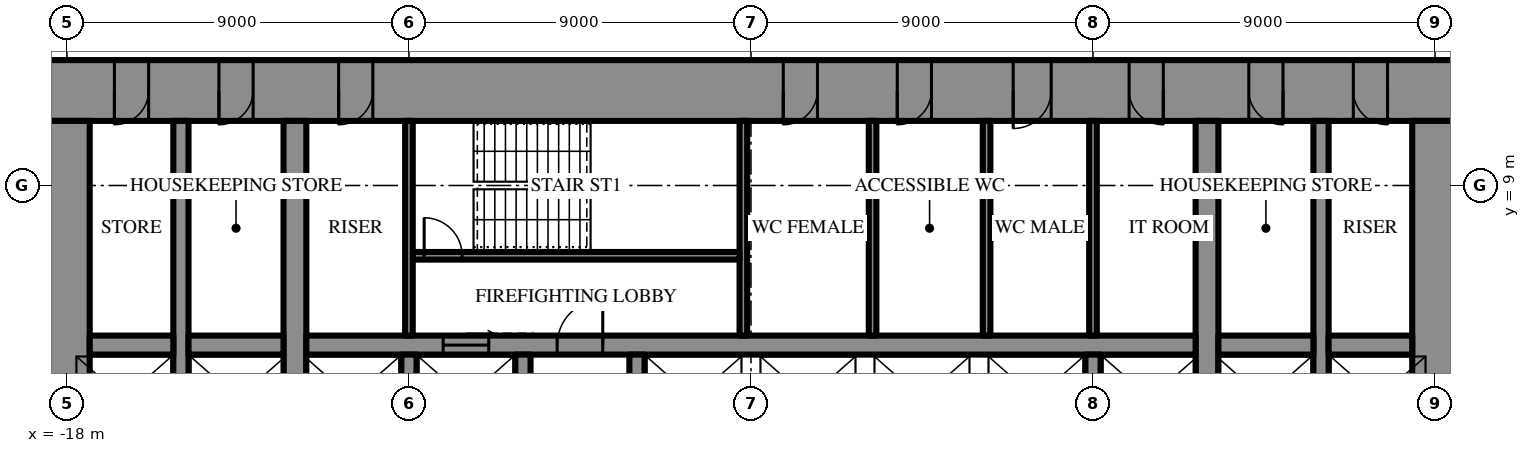
"""IFC4 building model, lengths in metres.
Left out: names, types, materials, properties, quantities, classifications, styles, units other than length and angle.
Written with IfcOpenShell. Run it as: python <this file> out.ifc"""

import sys

from ifc_helpers import new_model, si_unit, direction, frame, frame_2d, origin, place, context, subcontext, project, spatial, rectangle, extrude, element, fill, save


model = new_model("IFC4")
c1 = context("Model", 3, precision=1e-05, world=origin(), true_north=direction((0.0, 1.0)))
c2 = subcontext(c1, "Body", "Model", "MODEL_VIEW")
j1 = project(units=[si_unit("LENGTHUNIT", "METRE"), si_unit("PLANEANGLEUNIT", "RADIAN")], contexts=[c1])
p1 = place(None, origin())
s1 = spatial("IfcSite", under=j1, at=p1, CompositionType="ELEMENT")
p2 = place(p1, origin())
s2 = spatial("IfcBuilding", under=s1, at=p2, CompositionType="ELEMENT")
p3 = place(p2, frame((0.0, 0.0, 57.1)))
s3 = spatial("IfcBuildingStorey", under=s2, at=p3, CompositionType="ELEMENT", Elevation=57.1)
p4 = place(p3, frame((-18.6, 11.5, 0.0), z_axis=(0.0, 0.0, 1.0), x_axis=(1.0, 0.0, 0.0)))
e1 = element("IfcWall", 1, at=p4, inside=s3, PredefinedType="SHEAR", context=c2, shape_type="SweptSolid", body=[
    extrude(rectangle(XDim=37.2, YDim=1.6, at=frame_2d((18.6, 0.0))), origin(), (0.0, 0.0, 1.0), 4.2),
])
p5 = place(p4, frame((19.45, 0.0, 0.0)))
e2 = element("IfcOpeningElement", 2, at=p5, cuts=e1, PredefinedType="OPENING", context=c2, shape_type="SweptSolid", body=[
    extrude(rectangle(XDim=0.9, YDim=2.2, at=frame_2d((0.45, 1.1))), frame((0.0, 0.81, 0.0), z_axis=(0.0, -1.0, 0.0), x_axis=(1.0, 0.0, 0.0)), (0.0, 0.0, 1.0), 1.62),
])
p6 = place(p4, frame((22.45, 0.0, 0.0)))
e3 = element("IfcOpeningElement", 3, at=p6, cuts=e1, PredefinedType="OPENING", context=c2, shape_type="SweptSolid", body=[
    extrude(rectangle(XDim=0.9, YDim=2.2, at=frame_2d((0.45, 1.1))), frame((0.0, 0.81, 0.0), z_axis=(0.0, -1.0, 0.0), x_axis=(1.0, 0.0, 0.0)), (0.0, 0.0, 1.0), 1.62),
])
p7 = place(p4, frame((25.5, 0.0, 0.0)))
e4 = element("IfcOpeningElement", 4, at=p7, cuts=e1, PredefinedType="OPENING", context=c2, shape_type="SweptSolid", body=[
    extrude(rectangle(XDim=1.0, YDim=2.2, at=frame_2d((0.5, 1.1))), frame((0.0, 0.81, 0.0), z_axis=(0.0, -1.0, 0.0), x_axis=(1.0, 0.0, 0.0)), (0.0, 0.0, 1.0), 1.62),
])
p8 = place(p4, frame((1.85, 0.0, 0.0)))
e5 = element("IfcOpeningElement", 5, at=p8, cuts=e1, PredefinedType="OPENING", context=c2, shape_type="SweptSolid", body=[
    extrude(rectangle(XDim=0.9, YDim=2.2, at=frame_2d((0.45, 1.1))), frame((0.0, 0.81, 0.0), z_axis=(0.0, -1.0, 0.0), x_axis=(1.0, 0.0, 0.0)), (0.0, 0.0, 1.0), 1.62),
])
p9 = place(p4, frame((4.6, 0.0, 0.0)))
e6 = element("IfcOpeningElement", 6, at=p9, cuts=e1, PredefinedType="OPENING", context=c2, shape_type="SweptSolid", body=[
    extrude(rectangle(XDim=0.9, YDim=2.2, at=frame_2d((0.45, 1.1))), frame((0.0, 0.81, 0.0), z_axis=(0.0, -1.0, 0.0), x_axis=(1.0, 0.0, 0.0)), (0.0, 0.0, 1.0), 1.62),
])
p10 = place(p4, frame((7.75, 0.0, 0.0)))
e7 = element("IfcOpeningElement", 7, at=p10, cuts=e1, PredefinedType="OPENING", context=c2, shape_type="SweptSolid", body=[
    extrude(rectangle(XDim=0.9, YDim=2.2, at=frame_2d((0.45, 1.1))), frame((0.0, 0.81, 0.0), z_axis=(0.0, -1.0, 0.0), x_axis=(1.0, 0.0, 0.0)), (0.0, 0.0, 1.0), 1.62),
])
p11 = place(p4, frame((28.55, 0.0, 0.0)))
e8 = element("IfcOpeningElement", 8, at=p11, cuts=e1, PredefinedType="OPENING", context=c2, shape_type="SweptSolid", body=[
    extrude(rectangle(XDim=0.9, YDim=2.2, at=frame_2d((0.45, 1.1))), frame((0.0, 0.81, 0.0), z_axis=(0.0, -1.0, 0.0), x_axis=(1.0, 0.0, 0.0)), (0.0, 0.0, 1.0), 1.62),
])
p12 = place(p4, frame((31.7, 0.0, 0.0)))
e9 = element("IfcOpeningElement", 9, at=p12, cuts=e1, PredefinedType="OPENING", context=c2, shape_type="SweptSolid", body=[
    extrude(rectangle(XDim=0.9, YDim=2.2, at=frame_2d((0.45, 1.1))), frame((0.0, 0.81, 0.0), z_axis=(0.0, -1.0, 0.0), x_axis=(1.0, 0.0, 0.0)), (0.0, 0.0, 1.0), 1.62),
])
p13 = place(p4, frame((34.45, 0.0, 0.0)))
e10 = element("IfcOpeningElement", 10, at=p13, cuts=e1, PredefinedType="OPENING", context=c2, shape_type="SweptSolid", body=[
    extrude(rectangle(XDim=0.9, YDim=2.2, at=frame_2d((0.45, 1.1))), frame((0.0, 0.81, 0.0), z_axis=(0.0, -1.0, 0.0), x_axis=(1.0, 0.0, 0.0)), (0.0, 0.0, 1.0), 1.62),
])
p14 = place(p3, frame((18.0, -10.7, 0.0), z_axis=(0.0, 0.0, 1.0), x_axis=(0.0, 1.0, 0.0)))
e11 = element("IfcWall", 11, at=p14, inside=s3, PredefinedType="SHEAR", context=c2, shape_type="SweptSolid", body=[
    extrude(rectangle(XDim=21.4, YDim=1.2, at=frame_2d((10.7, 0.0))), origin(), (0.0, 0.0, 1.0), 4.2),
])
p15 = place(p14, frame((9.8, 0.0, 0.0)))
e12 = element("IfcOpeningElement", 12, at=p15, cuts=e11, PredefinedType="OPENING", context=c2, shape_type="SweptSolid", body=[
    extrude(rectangle(XDim=1.8, YDim=2.4, at=frame_2d((0.9, 1.2))), frame((0.0, 0.61, 0.0), z_axis=(0.0, -1.0, 0.0), x_axis=(1.0, 0.0, 0.0)), (0.0, 0.0, 1.0), 1.22),
])
p16 = place(p3, frame((-18.0, 10.7, 0.0), z_axis=(0.0, 0.0, 1.0), x_axis=(0.0, -1.0, 0.0)))
e13 = element("IfcWall", 13, at=p16, inside=s3, PredefinedType="SHEAR", context=c2, shape_type="SweptSolid", body=[
    extrude(rectangle(XDim=21.4, YDim=1.2, at=frame_2d((10.7, 0.0))), origin(), (0.0, 0.0, 1.0), 4.2),
])
p17 = place(p16, frame((9.8, 0.0, 0.0)))
e14 = element("IfcOpeningElement", 14, at=p17, cuts=e13, PredefinedType="OPENING", context=c2, shape_type="SweptSolid", body=[
    extrude(rectangle(XDim=1.8, YDim=2.4, at=frame_2d((0.9, 1.2))), frame((0.0, 0.61, 0.0), z_axis=(0.0, -1.0, 0.0), x_axis=(1.0, 0.0, 0.0)), (0.0, 0.0, 1.0), 1.22),
])
p18 = place(p3, frame((12.0, -10.7, 0.0), z_axis=(0.0, 0.0, 1.0), x_axis=(0.0, 1.0, 0.0)))
e15 = element("IfcWall", 15, at=p18, inside=s3, PredefinedType="SHEAR", context=c2, shape_type="SweptSolid", body=[
    extrude(rectangle(XDim=21.4, YDim=0.6, at=frame_2d((10.7, 0.0))), origin(), (0.0, 0.0, 1.0), 4.2),
])
p19 = place(p18, frame((9.8, 0.0, 0.0)))
e16 = element("IfcOpeningElement", 16, at=p19, cuts=e15, PredefinedType="OPENING", context=c2, shape_type="SweptSolid", body=[
    extrude(rectangle(XDim=1.8, YDim=2.4, at=frame_2d((0.9, 1.2))), frame((0.0, 0.31, 0.0), z_axis=(0.0, -1.0, 0.0), x_axis=(1.0, 0.0, 0.0)), (0.0, 0.0, 1.0), 0.62),
])
p20 = place(p3, frame((-12.0, -10.7, 0.0), z_axis=(0.0, 0.0, 1.0), x_axis=(0.0, 1.0, 0.0)))
e17 = element("IfcWall", 17, at=p20, inside=s3, PredefinedType="SHEAR", context=c2, shape_type="SweptSolid", body=[
    extrude(rectangle(XDim=21.4, YDim=0.6, at=frame_2d((10.7, 0.0))), origin(), (0.0, 0.0, 1.0), 4.2),
])
p21 = place(p20, frame((9.8, 0.0, 0.0)))
e18 = element("IfcOpeningElement", 18, at=p21, cuts=e17, PredefinedType="OPENING", context=c2, shape_type="SweptSolid", body=[
    extrude(rectangle(XDim=1.8, YDim=2.4, at=frame_2d((0.9, 1.2))), frame((0.0, 0.31, 0.0), z_axis=(0.0, -1.0, 0.0), x_axis=(1.0, 0.0, 0.0)), (0.0, 0.0, 1.0), 0.62),
])
p22 = place(p3, frame((15.0, -10.7, 0.0), z_axis=(0.0, 0.0, 1.0), x_axis=(0.0, 1.0, 0.0)))
e19 = element("IfcWall", 19, at=p22, inside=s3, PredefinedType="SHEAR", context=c2, shape_type="SweptSolid", body=[
    extrude(rectangle(XDim=21.4, YDim=0.4, at=frame_2d((10.7, 0.0))), origin(), (0.0, 0.0, 1.0), 4.2),
])
p23 = place(p22, frame((9.8, 0.0, 0.0)))
e20 = element("IfcOpeningElement", 20, at=p23, cuts=e19, PredefinedType="OPENING", context=c2, shape_type="SweptSolid", body=[
    extrude(rectangle(XDim=1.8, YDim=2.4, at=frame_2d((0.9, 1.2))), frame((0.0, 0.21, 0.0), z_axis=(0.0, -1.0, 0.0), x_axis=(1.0, 0.0, 0.0)), (0.0, 0.0, 1.0), 0.42),
])
p24 = place(p3, frame((-15.0, -10.7, 0.0), z_axis=(0.0, 0.0, 1.0), x_axis=(0.0, 1.0, 0.0)))
e21 = element("IfcWall", 21, at=p24, inside=s3, PredefinedType="SHEAR", context=c2, shape_type="SweptSolid", body=[
    extrude(rectangle(XDim=21.4, YDim=0.4, at=frame_2d((10.7, 0.0))), origin(), (0.0, 0.0, 1.0), 4.2),
])
p25 = place(p24, frame((9.8, 0.0, 0.0)))
e22 = element("IfcOpeningElement", 22, at=p25, cuts=e21, PredefinedType="OPENING", context=c2, shape_type="SweptSolid", body=[
    extrude(rectangle(XDim=1.8, YDim=2.4, at=frame_2d((0.9, 1.2))), frame((0.0, 0.21, 0.0), z_axis=(0.0, -1.0, 0.0), x_axis=(1.0, 0.0, 0.0)), (0.0, 0.0, 1.0), 0.42),
])
p26 = place(p3, frame((-17.4, 4.8, 0.0), z_axis=(0.0, 0.0, 1.0), x_axis=(1.0, 0.0, 0.0)))
e23 = element("IfcWall", 23, at=p26, inside=s3, PredefinedType="SHEAR", context=c2, shape_type="SweptSolid", body=[
    extrude(rectangle(XDim=2.2, YDim=0.5, at=frame_2d((1.1, 0.0))), origin(), (0.0, 0.0, 1.0), 4.2),
])
p27 = place(p3, frame((-14.8, 4.8, 0.0), z_axis=(0.0, 0.0, 1.0), x_axis=(1.0, 0.0, 0.0)))
e24 = element("IfcWall", 24, at=p27, inside=s3, PredefinedType="SHEAR", context=c2, shape_type="SweptSolid", body=[
    extrude(rectangle(XDim=2.5, YDim=0.5, at=frame_2d((1.25, 0.0))), origin(), (0.0, 0.0, 1.0), 4.2),
])
p28 = place(p3, frame((-11.7, 4.8, 0.0), z_axis=(0.0, 0.0, 1.0), x_axis=(1.0, 0.0, 0.0)))
e25 = element("IfcWall", 25, at=p28, inside=s3, PredefinedType="SHEAR", context=c2, shape_type="SweptSolid", body=[
    extrude(rectangle(XDim=23.4, YDim=0.5, at=frame_2d((11.7, 0.0))), origin(), (0.0, 0.0, 1.0), 4.2),
])
p29 = place(p28, frame((6.6, 0.0, 0.0)))
e26 = element("IfcOpeningElement", 26, at=p29, cuts=e25, PredefinedType="OPENING", context=c2, shape_type="SweptSolid", body=[
    extrude(rectangle(XDim=1.2, YDim=2.2, at=frame_2d((0.6, 1.1))), frame((0.0, 0.26, 0.0), z_axis=(0.0, -1.0, 0.0), x_axis=(1.0, 0.0, 0.0)), (0.0, 0.0, 1.0), 0.52),
])
p30 = place(p28, frame((3.6, 0.0, 0.0)))
e27 = element("IfcOpeningElement", 27, at=p30, cuts=e25, PredefinedType="OPENING", context=c2, shape_type="SweptSolid", body=[
    extrude(rectangle(XDim=1.2, YDim=2.2, at=frame_2d((0.6, 1.1))), frame((0.0, 0.26, 0.0), z_axis=(0.0, -1.0, 0.0), x_axis=(1.0, 0.0, 0.0)), (0.0, 0.0, 1.0), 0.52),
])
p31 = place(p3, frame((12.3, 4.8, 0.0), z_axis=(0.0, 0.0, 1.0), x_axis=(1.0, 0.0, 0.0)))
e28 = element("IfcWall", 28, at=p31, inside=s3, PredefinedType="SHEAR", context=c2, shape_type="SweptSolid", body=[
    extrude(rectangle(XDim=2.5, YDim=0.5, at=frame_2d((1.25, 0.0))), origin(), (0.0, 0.0, 1.0), 4.2),
])
p32 = place(p3, frame((15.2, 4.8, 0.0), z_axis=(0.0, 0.0, 1.0), x_axis=(1.0, 0.0, 0.0)))
e29 = element("IfcWall", 29, at=p32, inside=s3, PredefinedType="SHEAR", context=c2, shape_type="SweptSolid", body=[
    extrude(rectangle(XDim=2.2, YDim=0.5, at=frame_2d((1.1, 0.0))), origin(), (0.0, 0.0, 1.0), 4.2),
])
for number, where, z_axis, x_axis in (
    (30, (-9.0, 2.25, 0.0), (0.0, 0.0, 1.0), (0.0, 1.0, 0.0)),
    (31, (-6.0, 2.25, 0.0), (0.0, 0.0, 1.0), (0.0, 1.0, 0.0)),
    (32, (-3.0, 2.25, 0.0), (0.0, 0.0, 1.0), (0.0, 1.0, 0.0)),
    (33, (9.0, 2.25, 0.0), (0.0, 0.0, 1.0), (0.0, 1.0, 0.0)),
):
    element("IfcWall", number, at=place(p3, frame(where, z_axis=z_axis, x_axis=x_axis)), inside=s3, PredefinedType="SHEAR", context=c2, shape_type="SweptSolid", body=[
        extrude(rectangle(XDim=2.3, YDim=0.4, at=frame_2d((1.15, 0.0))), origin(), (0.0, 0.0, 1.0), 4.2),
    ])
p33 = place(p3, frame((-0.2, 5.05, 0.0), z_axis=(0.0, 0.0, 1.0), x_axis=(0.0, 1.0, 0.0)))
e34 = element("IfcWall", 34, at=p33, inside=s3, PredefinedType="SHEAR", context=c2, shape_type="SweptSolid", body=[
    extrude(rectangle(XDim=5.65, YDim=0.2, at=frame_2d((2.825, 0.0))), origin(), (0.0, 0.0, 1.0), 4.2),
])
p34 = place(p3, frame((-8.9, 7.15, 0.0), z_axis=(0.0, 0.0, 1.0), x_axis=(1.0, 0.0, 0.0)))
e35 = element("IfcWall", 35, at=p34, inside=s3, PredefinedType="SHEAR", context=c2, shape_type="SweptSolid", body=[
    extrude(rectangle(XDim=8.6, YDim=0.2, at=frame_2d((4.3, 0.0))), origin(), (0.0, 0.0, 1.0), 4.2),
])
p35 = place(p34, frame((0.3, 0.0, 0.0)))
e36 = element("IfcOpeningElement", 36, at=p35, cuts=e35, PredefinedType="OPENING", context=c2, shape_type="SweptSolid", body=[
    extrude(rectangle(XDim=1.0, YDim=2.2, at=frame_2d((0.5, 1.1))), frame((0.0, 0.11, 0.0), z_axis=(0.0, -1.0, 0.0), x_axis=(1.0, 0.0, 0.0)), (0.0, 0.0, 1.0), 0.22),
])
for number, where, z_axis, x_axis in (
    (37, (-9.0, 5.05, 0.0), (0.0, 0.0, 1.0), (0.0, 1.0, 0.0)),
    (38, (9.0, 5.05, 0.0), (0.0, 0.0, 1.0), (0.0, 1.0, 0.0)),
    (39, (3.2, 5.05, 0.0), (0.0, 0.0, 1.0), (0.0, 1.0, 0.0)),
    (40, (6.2, 5.05, 0.0), (0.0, 0.0, 1.0), (0.0, 1.0, 0.0)),
):
    element("IfcWall", number, at=place(p3, frame(where, z_axis=z_axis, x_axis=x_axis)), inside=s3, PredefinedType="PARTITIONING", context=c2, shape_type="SweptSolid", body=[
        extrude(rectangle(XDim=5.65, YDim=0.2, at=frame_2d((2.825, 0.0))), origin(), (0.0, 0.0, 1.0), 4.0),
    ])
p36 = place(p29, origin())
e41 = element("IfcDoor", 41, at=p36, inside=s3, OperationType="SINGLE_SWING_LEFT", PredefinedType="DOOR", context=c2, shape_type="SweptSolid", body=[
    extrude(rectangle(XDim=1.2, YDim=2.2, at=frame_2d((0.6, 1.1))), frame((0.0, 0.025, 0.0), z_axis=(0.0, -1.0, 0.0), x_axis=(1.0, 0.0, 0.0)), (0.0, 0.0, 1.0), 0.05),
])
fill(e26, e41)
p37 = place(p35, origin())
e42 = element("IfcDoor", 42, at=p37, inside=s3, OperationType="SINGLE_SWING_RIGHT", PredefinedType="DOOR", context=c2, shape_type="SweptSolid", body=[
    extrude(rectangle(XDim=1.0, YDim=2.2, at=frame_2d((0.5, 1.1))), frame((0.0, 0.025, 0.0), z_axis=(0.0, -1.0, 0.0), x_axis=(1.0, 0.0, 0.0)), (0.0, 0.0, 1.0), 0.05),
])
fill(e36, e42)
p38 = place(p5, frame((0.9, 0.0, 0.0), z_axis=(0.0, 0.0, 1.0), x_axis=(-1.0, 0.0, 0.0)))
e43 = element("IfcDoor", 43, at=p38, inside=s3, OperationType="SINGLE_SWING_LEFT", PredefinedType="DOOR", context=c2, shape_type="SweptSolid", body=[
    extrude(rectangle(XDim=0.9, YDim=2.2, at=frame_2d((0.45, 1.1))), frame((0.0, 0.025, 0.0), z_axis=(0.0, -1.0, 0.0), x_axis=(1.0, 0.0, 0.0)), (0.0, 0.0, 1.0), 0.05),
])
fill(e2, e43)
p39 = place(p6, frame((0.9, 0.0, 0.0), z_axis=(0.0, 0.0, 1.0), x_axis=(-1.0, 0.0, 0.0)))
e44 = element("IfcDoor", 44, at=p39, inside=s3, OperationType="SINGLE_SWING_LEFT", PredefinedType="DOOR", context=c2, shape_type="SweptSolid", body=[
    extrude(rectangle(XDim=0.9, YDim=2.2, at=frame_2d((0.45, 1.1))), frame((0.0, 0.025, 0.0), z_axis=(0.0, -1.0, 0.0), x_axis=(1.0, 0.0, 0.0)), (0.0, 0.0, 1.0), 0.05),
])
fill(e3, e44)
p40 = place(p7, frame((1.0, 0.0, 0.0), z_axis=(0.0, 0.0, 1.0), x_axis=(-1.0, 0.0, 0.0)))
e45 = element("IfcDoor", 45, at=p40, inside=s3, OperationType="SINGLE_SWING_LEFT", PredefinedType="DOOR", context=c2, shape_type="SweptSolid", body=[
    extrude(rectangle(XDim=1.0, YDim=2.2, at=frame_2d((0.5, 1.1))), frame((0.0, 0.025, 0.0), z_axis=(0.0, -1.0, 0.0), x_axis=(1.0, 0.0, 0.0)), (0.0, 0.0, 1.0), 0.05),
])
fill(e4, e45)
p41 = place(p8, frame((0.9, 0.0, 0.0), z_axis=(0.0, 0.0, 1.0), x_axis=(-1.0, 0.0, 0.0)))
e46 = element("IfcDoor", 46, at=p41, inside=s3, OperationType="SINGLE_SWING_LEFT", PredefinedType="DOOR", context=c2, shape_type="SweptSolid", body=[
    extrude(rectangle(XDim=0.9, YDim=2.2, at=frame_2d((0.45, 1.1))), frame((0.0, 0.025, 0.0), z_axis=(0.0, -1.0, 0.0), x_axis=(1.0, 0.0, 0.0)), (0.0, 0.0, 1.0), 0.05),
])
fill(e5, e46)
p42 = place(p9, frame((0.9, 0.0, 0.0), z_axis=(0.0, 0.0, 1.0), x_axis=(-1.0, 0.0, 0.0)))
e47 = element("IfcDoor", 47, at=p42, inside=s3, OperationType="SINGLE_SWING_LEFT", PredefinedType="DOOR", context=c2, shape_type="SweptSolid", body=[
    extrude(rectangle(XDim=0.9, YDim=2.2, at=frame_2d((0.45, 1.1))), frame((0.0, 0.025, 0.0), z_axis=(0.0, -1.0, 0.0), x_axis=(1.0, 0.0, 0.0)), (0.0, 0.0, 1.0), 0.05),
])
fill(e6, e47)
p43 = place(p10, frame((0.9, 0.0, 0.0), z_axis=(0.0, 0.0, 1.0), x_axis=(-1.0, 0.0, 0.0)))
e48 = element("IfcDoor", 48, at=p43, inside=s3, OperationType="SINGLE_SWING_LEFT", PredefinedType="DOOR", context=c2, shape_type="SweptSolid", body=[
    extrude(rectangle(XDim=0.9, YDim=2.2, at=frame_2d((0.45, 1.1))), frame((0.0, 0.025, 0.0), z_axis=(0.0, -1.0, 0.0), x_axis=(1.0, 0.0, 0.0)), (0.0, 0.0, 1.0), 0.05),
])
fill(e7, e48)
p44 = place(p11, frame((0.9, 0.0, 0.0), z_axis=(0.0, 0.0, 1.0), x_axis=(-1.0, 0.0, 0.0)))
e49 = element("IfcDoor", 49, at=p44, inside=s3, OperationType="SINGLE_SWING_RIGHT", PredefinedType="DOOR", context=c2, shape_type="SweptSolid", body=[
    extrude(rectangle(XDim=0.9, YDim=2.2, at=frame_2d((0.45, 1.1))), frame((0.0, 0.025, 0.0), z_axis=(0.0, -1.0, 0.0), x_axis=(1.0, 0.0, 0.0)), (0.0, 0.0, 1.0), 0.05),
])
fill(e8, e49)
p45 = place(p12, frame((0.9, 0.0, 0.0), z_axis=(0.0, 0.0, 1.0), x_axis=(-1.0, 0.0, 0.0)))
e50 = element("IfcDoor", 50, at=p45, inside=s3, OperationType="SINGLE_SWING_RIGHT", PredefinedType="DOOR", context=c2, shape_type="SweptSolid", body=[
    extrude(rectangle(XDim=0.9, YDim=2.2, at=frame_2d((0.45, 1.1))), frame((0.0, 0.025, 0.0), z_axis=(0.0, -1.0, 0.0), x_axis=(1.0, 0.0, 0.0)), (0.0, 0.0, 1.0), 0.05),
])
fill(e9, e50)
p46 = place(p13, frame((0.9, 0.0, 0.0), z_axis=(0.0, 0.0, 1.0), x_axis=(-1.0, 0.0, 0.0)))
e51 = element("IfcDoor", 51, at=p46, inside=s3, OperationType="SINGLE_SWING_RIGHT", PredefinedType="DOOR", context=c2, shape_type="SweptSolid", body=[
    extrude(rectangle(XDim=0.9, YDim=2.2, at=frame_2d((0.45, 1.1))), frame((0.0, 0.025, 0.0), z_axis=(0.0, -1.0, 0.0), x_axis=(1.0, 0.0, 0.0)), (0.0, 0.0, 1.0), 0.05),
])
fill(e10, e51)
p47 = place(p30, origin())
e52 = element("IfcDoor", 52, at=p47, inside=s3, OperationType="SLIDING_TO_LEFT", PredefinedType="DOOR", context=c2, shape_type="SweptSolid", body=[
    extrude(rectangle(XDim=1.2, YDim=2.2, at=frame_2d((0.6, 1.1))), frame((0.0, 0.025, 0.0), z_axis=(0.0, -1.0, 0.0), x_axis=(1.0, 0.0, 0.0)), (0.0, 0.0, 1.0), 0.05),
])
fill(e27, e52)
save(model, sys.argv[1])
